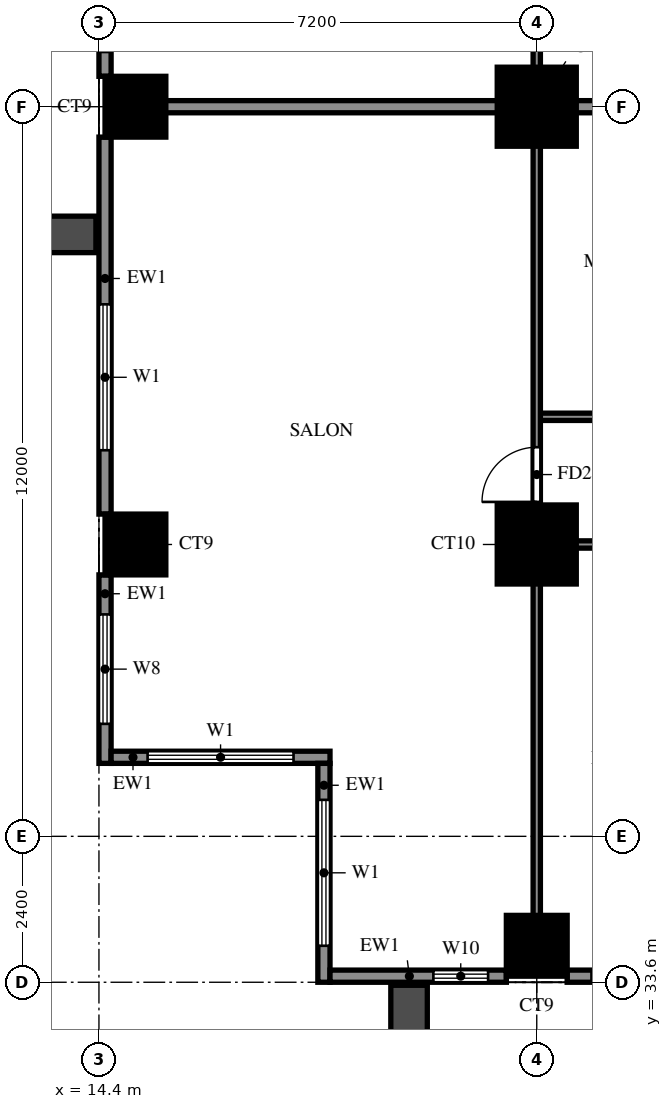
"""IFC4 building model, lengths in metres.
Left out: names, types, materials, properties, quantities, classifications, styles, units other than length and angle.
Written with IfcOpenShell. Run it as: python <this file> out.ifc"""

import sys

from ifc_helpers import new_model, si_unit, direction, frame, frame_2d, origin, origin_2d, place, context, subcontext, project, spatial, rectangle, extrude, source, transform, mapped, element, fill, save


model = new_model("IFC4")
c1 = context("Model", 3, precision=1e-05, world=origin(), true_north=direction((0.0, 1.0)))
c2 = subcontext(c1, "Body", "Model", "MODEL_VIEW")
j1 = project(units=[si_unit("LENGTHUNIT", "METRE"), si_unit("PLANEANGLEUNIT", "RADIAN")], contexts=[c1])
p1 = place(None, origin())
s1 = spatial("IfcSite", under=j1, at=p1, CompositionType="ELEMENT")
p2 = place(p1, origin())
s2 = spatial("IfcBuilding", under=s1, at=p2, CompositionType="ELEMENT")
p3 = place(p2, frame((0.0, 0.0, 62.0)))
s3 = spatial("IfcBuildingStorey", under=s2, at=p3, CompositionType="ELEMENT", Elevation=62.0)
m1 = source(origin(), c2, "Body", "SweptSolid", [
    extrude(rectangle(XDim=1.0, YDim=1.0, at=origin_2d()), origin(), (0.0, 0.0, 1.0), 3.18),
])
for number, where, z_axis, x_axis in (
    (1, (21.6, 34.2, 0.0), (0.0, 0.0, 1.0), (1.0, 0.0, 0.0)),
    (2, (15.0, 40.8, 0.0), (0.0, 0.0, 1.0), (1.0, 0.0, 0.0)),
):
    element("IfcColumn", number, at=place(p3, frame(where, z_axis=z_axis, x_axis=x_axis)), inside=s3, PredefinedType="COLUMN", context=c2, shape_type="MappedRepresentation", body=[
        mapped(m1, transform((0.0, 0.0, 0.0))),
    ])
m2 = source(origin(), c2, "Body", "SweptSolid", [
    extrude(rectangle(XDim=1.3, YDim=1.3, at=origin_2d()), origin(), (0.0, 0.0, 1.0), 3.18),
])
p4 = place(p3, frame((21.6, 40.8, 0.0), z_axis=(0.0, 0.0, 1.0), x_axis=(1.0, 0.0, 0.0)))
e3 = element("IfcColumn", 3, at=p4, inside=s3, PredefinedType="COLUMN", context=c2, shape_type="MappedRepresentation", body=[
    mapped(m2, transform((0.0, 0.0, 0.0))),
])
p5 = place(p3, frame((15.0, 48.0, 0.0), z_axis=(0.0, 0.0, 1.0), x_axis=(1.0, 0.0, 0.0)))
e4 = element("IfcColumn", 4, at=p5, inside=s3, PredefinedType="COLUMN", context=c2, shape_type="MappedRepresentation", body=[
    mapped(m1, transform((0.0, 0.0, 0.0))),
])
p6 = place(p3, frame((21.6, 48.0, 0.0), z_axis=(0.0, 0.0, 1.0), x_axis=(1.0, 0.0, 0.0)))
e5 = element("IfcColumn", 5, at=p6, inside=s3, PredefinedType="COLUMN", context=c2, shape_type="MappedRepresentation", body=[
    mapped(m2, transform((0.0, 0.0, 0.0))),
])
p7 = place(p3, frame((14.5, 54.7, 0.0), z_axis=(0.0, 0.0, 1.0), x_axis=(0.0, -1.0, 0.0)))
e6 = element("IfcWall", 6, at=p7, inside=s3, PredefinedType="SOLIDWALL", context=c2, shape_type="SweptSolid", body=[
    extrude(rectangle(XDim=6.2, YDim=0.2, at=frame_2d((3.1, 0.0))), origin(), (0.0, 0.0, 1.0), 3.18),
])
p8 = place(p7, frame((4.0, 0.0, 0.0)))
e7 = element("IfcOpeningElement", 7, at=p8, cuts=e6, PredefinedType="OPENING", context=c2, shape_type="SweptSolid", body=[
    extrude(rectangle(XDim=1.8, YDim=2.4, at=frame_2d((0.9, 1.2))), frame((0.0, 0.11, 0.0), z_axis=(0.0, -1.0, 0.0), x_axis=(1.0, 0.0, 0.0)), (0.0, 0.0, 1.0), 0.22),
])
p9 = place(p7, frame((0.45, 0.0, 0.6)))
e8 = element("IfcOpeningElement", 8, at=p9, cuts=e6, PredefinedType="OPENING", context=c2, shape_type="SweptSolid", body=[
    extrude(rectangle(XDim=1.2, YDim=2.4, at=frame_2d((0.6, 1.2))), frame((0.0, 0.11, 0.0), z_axis=(0.0, -1.0, 0.0), x_axis=(1.0, 0.0, 0.0)), (0.0, 0.0, 1.0), 0.22),
])
p10 = place(p3, frame((14.5, 47.5, 0.0), z_axis=(0.0, 0.0, 1.0), x_axis=(0.0, -1.0, 0.0)))
e9 = element("IfcWall", 9, at=p10, inside=s3, PredefinedType="SOLIDWALL", context=c2, shape_type="SweptSolid", body=[
    extrude(rectangle(XDim=6.2, YDim=0.2, at=frame_2d((3.1, 0.0))), origin(), (0.0, 0.0, 1.0), 3.18),
])
p11 = place(p10, frame((2.75, 0.0, 0.6)))
e10 = element("IfcOpeningElement", 10, at=p11, cuts=e9, PredefinedType="OPENING", context=c2, shape_type="SweptSolid", body=[
    extrude(rectangle(XDim=2.4, YDim=2.4, at=frame_2d((1.2, 1.2))), frame((0.0, 0.11, 0.0), z_axis=(0.0, -1.0, 0.0), x_axis=(1.0, 0.0, 0.0)), (0.0, 0.0, 1.0), 0.22),
])
p12 = place(p3, frame((14.5, 40.3, 0.0), z_axis=(0.0, 0.0, 1.0), x_axis=(0.0, -1.0, 0.0)))
e11 = element("IfcWall", 11, at=p12, inside=s3, PredefinedType="SOLIDWALL", context=c2, shape_type="SweptSolid", body=[
    extrude(rectangle(XDim=3.1, YDim=0.2, at=frame_2d((1.55, 0.0))), origin(), (0.0, 0.0, 1.0), 3.18),
])
p13 = place(p12, frame((0.65, 0.0, 0.6)))
e12 = element("IfcOpeningElement", 12, at=p13, cuts=e11, PredefinedType="OPENING", context=c2, shape_type="SweptSolid", body=[
    extrude(rectangle(XDim=1.8, YDim=2.4, at=frame_2d((0.9, 1.2))), frame((0.0, 0.11, 0.0), z_axis=(0.0, -1.0, 0.0), x_axis=(1.0, 0.0, 0.0)), (0.0, 0.0, 1.0), 0.22),
])
p14 = place(p3, frame((14.6, 37.3, 0.0), z_axis=(0.0, 0.0, 1.0), x_axis=(1.0, 0.0, 0.0)))
e13 = element("IfcWall", 13, at=p14, inside=s3, PredefinedType="SOLIDWALL", context=c2, shape_type="SweptSolid", body=[
    extrude(rectangle(XDim=3.6, YDim=0.2, at=frame_2d((1.8, 0.0))), origin(), (0.0, 0.0, 1.0), 3.18),
])
p15 = place(p14, frame((0.6, 0.0, 0.6)))
e14 = element("IfcOpeningElement", 14, at=p15, cuts=e13, PredefinedType="OPENING", context=c2, shape_type="SweptSolid", body=[
    extrude(rectangle(XDim=2.4, YDim=2.4, at=frame_2d((1.2, 1.2))), frame((0.0, 0.11, 0.0), z_axis=(0.0, -1.0, 0.0), x_axis=(1.0, 0.0, 0.0)), (0.0, 0.0, 1.0), 0.22),
])
p16 = place(p3, frame((18.1, 37.2, 0.0), z_axis=(0.0, 0.0, 1.0), x_axis=(0.0, -1.0, 0.0)))
e15 = element("IfcWall", 15, at=p16, inside=s3, PredefinedType="SOLIDWALL", context=c2, shape_type="SweptSolid", body=[
    extrude(rectangle(XDim=3.6, YDim=0.2, at=frame_2d((1.8, 0.0))), origin(), (0.0, 0.0, 1.0), 3.18),
])
p17 = place(p16, frame((0.6, 0.0, 0.6)))
e16 = element("IfcOpeningElement", 16, at=p17, cuts=e15, PredefinedType="OPENING", context=c2, shape_type="SweptSolid", body=[
    extrude(rectangle(XDim=2.4, YDim=2.4, at=frame_2d((1.2, 1.2))), frame((0.0, 0.11, 0.0), z_axis=(0.0, -1.0, 0.0), x_axis=(1.0, 0.0, 0.0)), (0.0, 0.0, 1.0), 0.22),
])
p18 = place(p3, frame((18.2, 33.7, 0.0), z_axis=(0.0, 0.0, 1.0), x_axis=(1.0, 0.0, 0.0)))
e17 = element("IfcWall", 17, at=p18, inside=s3, PredefinedType="SOLIDWALL", context=c2, shape_type="SweptSolid", body=[
    extrude(rectangle(XDim=2.9, YDim=0.2, at=frame_2d((1.45, 0.0))), origin(), (0.0, 0.0, 1.0), 3.18),
])
p19 = place(p18, frame((1.7, 0.0, 0.6)))
e18 = element("IfcOpeningElement", 18, at=p19, cuts=e17, PredefinedType="OPENING", context=c2, shape_type="SweptSolid", body=[
    extrude(rectangle(XDim=0.9, YDim=2.4, at=frame_2d((0.45, 1.2))), frame((0.0, 0.11, 0.0), z_axis=(0.0, -1.0, 0.0), x_axis=(1.0, 0.0, 0.0)), (0.0, 0.0, 1.0), 0.22),
])
p20 = place(p3, frame((22.1, 33.7, 0.0), z_axis=(0.0, 0.0, 1.0), x_axis=(1.0, 0.0, 0.0)))
e19 = element("IfcWall", 19, at=p20, inside=s3, PredefinedType="SOLIDWALL", context=c2, shape_type="SweptSolid", body=[
    extrude(rectangle(XDim=6.2, YDim=0.2, at=frame_2d((3.1, 0.0))), origin(), (0.0, 0.0, 1.0), 3.18),
])
p21 = place(p20, frame((0.4, 0.0, 0.0)))
e20 = element("IfcOpeningElement", 20, at=p21, cuts=e19, PredefinedType="OPENING", context=c2, shape_type="SweptSolid", body=[
    extrude(rectangle(XDim=1.8, YDim=2.4, at=frame_2d((0.9, 1.2))), frame((0.0, 0.11, 0.0), z_axis=(0.0, -1.0, 0.0), x_axis=(1.0, 0.0, 0.0)), (0.0, 0.0, 1.0), 0.22),
])
p22 = place(p20, frame((4.55, 0.0, 0.6)))
e21 = element("IfcOpeningElement", 21, at=p22, cuts=e19, PredefinedType="OPENING", context=c2, shape_type="SweptSolid", body=[
    extrude(rectangle(XDim=1.2, YDim=2.4, at=frame_2d((0.6, 1.2))), frame((0.0, 0.11, 0.0), z_axis=(0.0, -1.0, 0.0), x_axis=(1.0, 0.0, 0.0)), (0.0, 0.0, 1.0), 0.22),
])
for number, where, z_axis, x_axis in (
    (22, (14.35, 45.9, 0.0), (0.0, 0.0, 1.0), (-1.0, 0.0, 0.0)),
    (23, (19.5, 33.55, 0.0), (0.0, 0.0, 1.0), (0.0, -1.0, 0.0)),
):
    element("IfcWall", number, at=place(p3, frame(where, z_axis=z_axis, x_axis=x_axis)), inside=s3, PredefinedType="SOLIDWALL", context=c2, shape_type="SweptSolid", body=[
        extrude(rectangle(XDim=2.65, YDim=0.6, at=frame_2d((1.325, 0.0))), origin(), (0.0, 0.0, 1.0), 2.85),
    ])
p23 = place(p3, frame((14.525, 48.0, 0.0), z_axis=(0.0, 0.0, 1.0), x_axis=(1.0, 0.0, 0.0)))
e24 = element("IfcWall", 24, at=p23, inside=s3, PredefinedType="SOLIDWALL", context=c2, shape_type="SweptSolid", body=[
    extrude(rectangle(XDim=19.075, YDim=0.2, at=frame_2d((9.538, 0.0))), origin(), (0.0, 0.0, 1.0), 3.18),
])
p24 = place(p3, frame((21.6, 40.8, 0.0), z_axis=(0.0, 0.0, 1.0), x_axis=(1.0, 0.0, 0.0)))
e25 = element("IfcWall", 25, at=p24, inside=s3, PredefinedType="PARTITIONING", context=c2, shape_type="SweptSolid", body=[
    extrude(rectangle(XDim=10.8, YDim=0.12, at=frame_2d((5.4, 0.0))), origin(), (0.0, 0.0, 1.0), 3.18),
])
p25 = place(p24, frame((1.35, 0.0, 0.0)))
e26 = element("IfcOpeningElement", 26, at=p25, cuts=e25, PredefinedType="OPENING", context=c2, shape_type="SweptSolid", body=[
    extrude(rectangle(XDim=0.9, YDim=2.1, at=frame_2d((0.45, 1.05))), frame((0.0, 0.07, 0.0), z_axis=(0.0, -1.0, 0.0), x_axis=(1.0, 0.0, 0.0)), (0.0, 0.0, 1.0), 0.14),
])
p26 = place(p24, frame((4.95, 0.0, 0.0)))
e27 = element("IfcOpeningElement", 27, at=p26, cuts=e25, PredefinedType="OPENING", context=c2, shape_type="SweptSolid", body=[
    extrude(rectangle(XDim=0.9, YDim=2.1, at=frame_2d((0.45, 1.05))), frame((0.0, 0.07, 0.0), z_axis=(0.0, -1.0, 0.0), x_axis=(1.0, 0.0, 0.0)), (0.0, 0.0, 1.0), 0.14),
])
p27 = place(p24, frame((8.55, 0.0, 0.0)))
e28 = element("IfcOpeningElement", 28, at=p27, cuts=e25, PredefinedType="OPENING", context=c2, shape_type="SweptSolid", body=[
    extrude(rectangle(XDim=0.9, YDim=2.1, at=frame_2d((0.45, 1.05))), frame((0.0, 0.07, 0.0), z_axis=(0.0, -1.0, 0.0), x_axis=(1.0, 0.0, 0.0)), (0.0, 0.0, 1.0), 0.14),
])
p28 = place(p3, frame((21.6, 42.9, 0.0), z_axis=(0.0, 0.0, 1.0), x_axis=(1.0, 0.0, 0.0)))
e29 = element("IfcWall", 29, at=p28, inside=s3, PredefinedType="PARTITIONING", context=c2, shape_type="SweptSolid", body=[
    extrude(rectangle(XDim=16.8, YDim=0.12, at=frame_2d((8.4, 0.0))), origin(), (0.0, 0.0, 1.0), 3.18),
])
p29 = place(p28, frame((1.375, 0.0, 0.0)))
e30 = element("IfcOpeningElement", 30, at=p29, cuts=e29, PredefinedType="OPENING", context=c2, shape_type="SweptSolid", body=[
    extrude(rectangle(XDim=0.9, YDim=2.1, at=frame_2d((0.45, 1.05))), frame((0.0, 0.07, 0.0), z_axis=(0.0, -1.0, 0.0), x_axis=(1.0, 0.0, 0.0)), (0.0, 0.0, 1.0), 0.14),
])
p30 = place(p28, frame((5.5, 0.0, 0.0)))
e31 = element("IfcOpeningElement", 31, at=p30, cuts=e29, PredefinedType="OPENING", context=c2, shape_type="SweptSolid", body=[
    extrude(rectangle(XDim=0.9, YDim=2.1, at=frame_2d((0.45, 1.05))), frame((0.0, 0.07, 0.0), z_axis=(0.0, -1.0, 0.0), x_axis=(1.0, 0.0, 0.0)), (0.0, 0.0, 1.0), 0.14),
])
p31 = place(p28, frame((9.725, 0.0, 0.0)))
e32 = element("IfcOpeningElement", 32, at=p31, cuts=e29, PredefinedType="OPENING", context=c2, shape_type="SweptSolid", body=[
    extrude(rectangle(XDim=0.8, YDim=2.1, at=frame_2d((0.4, 1.05))), frame((0.0, 0.07, 0.0), z_axis=(0.0, -1.0, 0.0), x_axis=(1.0, 0.0, 0.0)), (0.0, 0.0, 1.0), 0.14),
])
p32 = place(p28, frame((13.95, 0.0, 0.0)))
e33 = element("IfcOpeningElement", 33, at=p32, cuts=e29, PredefinedType="OPENING", context=c2, shape_type="SweptSolid", body=[
    extrude(rectangle(XDim=0.9, YDim=2.1, at=frame_2d((0.45, 1.05))), frame((0.0, 0.07, 0.0), z_axis=(0.0, -1.0, 0.0), x_axis=(1.0, 0.0, 0.0)), (0.0, 0.0, 1.0), 0.14),
])
p33 = place(p3, frame((21.6, 33.725, 0.0), z_axis=(0.0, 0.0, 1.0), x_axis=(0.0, 1.0, 0.0)))
e34 = element("IfcWall", 34, at=p33, inside=s3, PredefinedType="PARTITIONING", context=c2, shape_type="SweptSolid", body=[
    extrude(rectangle(XDim=39.475, YDim=0.12, at=frame_2d((19.737, 0.0))), origin(), (0.0, 0.0, 1.0), 3.18),
])
p34 = place(p33, frame((7.775, 0.0, 0.0)))
e35 = element("IfcOpeningElement", 35, at=p34, cuts=e34, PredefinedType="OPENING", context=c2, shape_type="SweptSolid", body=[
    extrude(rectangle(XDim=0.9, YDim=2.1, at=frame_2d((0.45, 1.05))), frame((0.0, 0.07, 0.0), z_axis=(0.0, -1.0, 0.0), x_axis=(1.0, 0.0, 0.0)), (0.0, 0.0, 1.0), 0.14),
])
p35 = place(p33, frame((15.625, 0.0, 0.0)))
e36 = element("IfcOpeningElement", 36, at=p35, cuts=e34, PredefinedType="OPENING", context=c2, shape_type="SweptSolid", body=[
    extrude(rectangle(XDim=0.9, YDim=2.1, at=frame_2d((0.45, 1.05))), frame((0.0, 0.07, 0.0), z_axis=(0.0, -1.0, 0.0), x_axis=(1.0, 0.0, 0.0)), (0.0, 0.0, 1.0), 0.14),
])
p36 = place(p33, frame((19.225, 0.0, 0.0)))
e37 = element("IfcOpeningElement", 37, at=p36, cuts=e34, PredefinedType="OPENING", context=c2, shape_type="SweptSolid", body=[
    extrude(rectangle(XDim=0.9, YDim=2.1, at=frame_2d((0.45, 1.05))), frame((0.0, 0.07, 0.0), z_axis=(0.0, -1.0, 0.0), x_axis=(1.0, 0.0, 0.0)), (0.0, 0.0, 1.0), 0.14),
])
p37 = place(p33, frame((24.325, 0.0, 0.0)))
e38 = element("IfcOpeningElement", 38, at=p37, cuts=e34, PredefinedType="OPENING", context=c2, shape_type="SweptSolid", body=[
    extrude(rectangle(XDim=1.5, YDim=2.1, at=frame_2d((0.75, 1.05))), frame((0.0, 0.07, 0.0), z_axis=(0.0, -1.0, 0.0), x_axis=(1.0, 0.0, 0.0)), (0.0, 0.0, 1.0), 0.14),
])
p38 = place(p33, frame((30.025, 0.0, 0.0)))
e39 = element("IfcOpeningElement", 39, at=p38, cuts=e34, PredefinedType="OPENING", context=c2, shape_type="SweptSolid", body=[
    extrude(rectangle(XDim=0.9, YDim=2.1, at=frame_2d((0.45, 1.05))), frame((0.0, 0.07, 0.0), z_axis=(0.0, -1.0, 0.0), x_axis=(1.0, 0.0, 0.0)), (0.0, 0.0, 1.0), 0.14),
])
p39 = place(p33, frame((33.625, 0.0, 0.0)))
e40 = element("IfcOpeningElement", 40, at=p39, cuts=e34, PredefinedType="OPENING", context=c2, shape_type="SweptSolid", body=[
    extrude(rectangle(XDim=0.9, YDim=2.1, at=frame_2d((0.45, 1.05))), frame((0.0, 0.07, 0.0), z_axis=(0.0, -1.0, 0.0), x_axis=(1.0, 0.0, 0.0)), (0.0, 0.0, 1.0), 0.14),
])
p40 = place(p33, frame((37.225, 0.0, 0.0)))
e41 = element("IfcOpeningElement", 41, at=p40, cuts=e34, PredefinedType="OPENING", context=c2, shape_type="SweptSolid", body=[
    extrude(rectangle(XDim=0.9, YDim=2.1, at=frame_2d((0.45, 1.05))), frame((0.0, 0.07, 0.0), z_axis=(0.0, -1.0, 0.0), x_axis=(1.0, 0.0, 0.0)), (0.0, 0.0, 1.0), 0.14),
])
p41 = place(p11, origin())
e42 = element("IfcWindow", 42, at=p41, inside=s3, PartitioningType="DOUBLE_PANEL_VERTICAL", PredefinedType="WINDOW", context=c2, shape_type="SweptSolid", body=[
    extrude(rectangle(XDim=2.4, YDim=2.4, at=frame_2d((1.2, 1.2))), frame((0.0, 0.03, 0.0), z_axis=(0.0, -1.0, 0.0), x_axis=(1.0, 0.0, 0.0)), (0.0, 0.0, 1.0), 0.06),
])
fill(e10, e42)
p42 = place(p13, origin())
e43 = element("IfcWindow", 43, at=p42, inside=s3, PartitioningType="DOUBLE_PANEL_VERTICAL", PredefinedType="WINDOW", context=c2, shape_type="SweptSolid", body=[
    extrude(rectangle(XDim=1.8, YDim=2.4, at=frame_2d((0.9, 1.2))), frame((0.0, 0.03, 0.0), z_axis=(0.0, -1.0, 0.0), x_axis=(1.0, 0.0, 0.0)), (0.0, 0.0, 1.0), 0.06),
])
fill(e12, e43)
p43 = place(p15, origin())
e44 = element("IfcWindow", 44, at=p43, inside=s3, PartitioningType="DOUBLE_PANEL_VERTICAL", PredefinedType="WINDOW", context=c2, shape_type="SweptSolid", body=[
    extrude(rectangle(XDim=2.4, YDim=2.4, at=frame_2d((1.2, 1.2))), frame((0.0, 0.03, 0.0), z_axis=(0.0, -1.0, 0.0), x_axis=(1.0, 0.0, 0.0)), (0.0, 0.0, 1.0), 0.06),
])
fill(e14, e44)
p44 = place(p17, origin())
e45 = element("IfcWindow", 45, at=p44, inside=s3, PartitioningType="DOUBLE_PANEL_VERTICAL", PredefinedType="WINDOW", context=c2, shape_type="SweptSolid", body=[
    extrude(rectangle(XDim=2.4, YDim=2.4, at=frame_2d((1.2, 1.2))), frame((0.0, 0.03, 0.0), z_axis=(0.0, -1.0, 0.0), x_axis=(1.0, 0.0, 0.0)), (0.0, 0.0, 1.0), 0.06),
])
fill(e16, e45)
p45 = place(p19, origin())
e46 = element("IfcWindow", 46, at=p45, inside=s3, PartitioningType="SINGLE_PANEL", PredefinedType="WINDOW", context=c2, shape_type="SweptSolid", body=[
    extrude(rectangle(XDim=0.9, YDim=2.4, at=frame_2d((0.45, 1.2))), frame((0.0, 0.03, 0.0), z_axis=(0.0, -1.0, 0.0), x_axis=(1.0, 0.0, 0.0)), (0.0, 0.0, 1.0), 0.06),
])
fill(e18, e46)
p46 = place(p21, origin())
e47 = element("IfcDoor", 47, at=p46, inside=s3, OperationType="DOUBLE_DOOR_SLIDING", PredefinedType="DOOR", context=c2, shape_type="SweptSolid", body=[
    extrude(rectangle(XDim=1.8, YDim=2.4, at=frame_2d((0.9, 1.2))), frame((0.0, 0.025, 0.0), z_axis=(0.0, -1.0, 0.0), x_axis=(1.0, 0.0, 0.0)), (0.0, 0.0, 1.0), 0.05),
])
fill(e20, e47)
p47 = place(p34, origin())
e48 = element("IfcDoor", 48, at=p47, inside=s3, OperationType="SINGLE_SWING_RIGHT", PredefinedType="DOOR", context=c2, shape_type="SweptSolid", body=[
    extrude(rectangle(XDim=0.9, YDim=2.1, at=frame_2d((0.45, 1.05))), frame((0.0, 0.025, 0.0), z_axis=(0.0, -1.0, 0.0), x_axis=(1.0, 0.0, 0.0)), (0.0, 0.0, 1.0), 0.05),
])
fill(e35, e48)
save(model, sys.argv[1])
